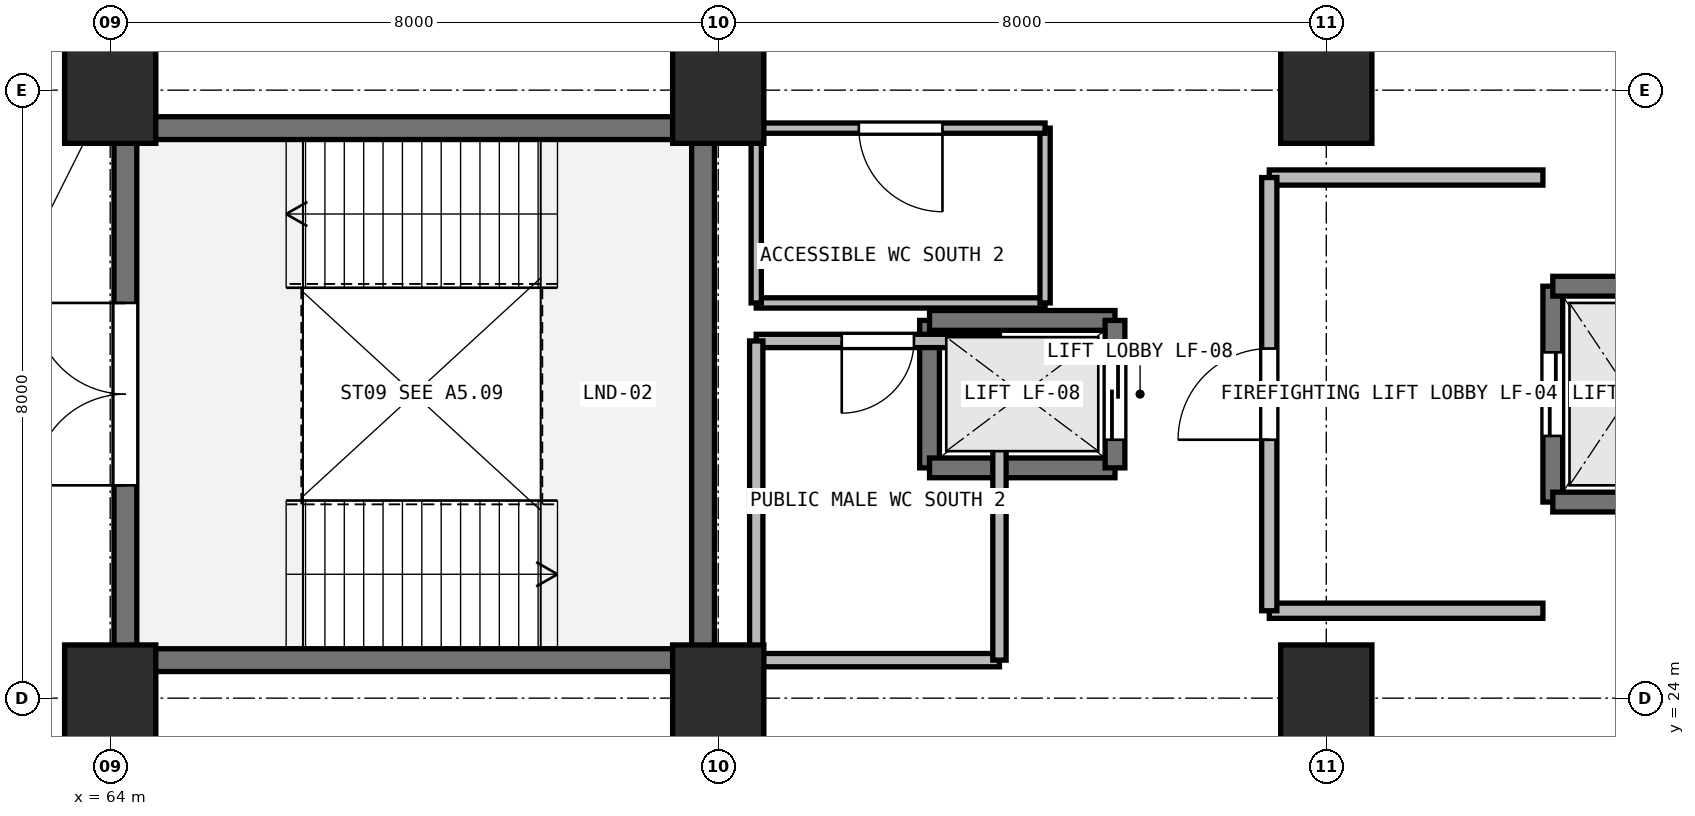
"""IFC4 building model, lengths in metres.
Left out: names, types, materials, properties, quantities, classifications, styles, units other than length and angle.
Written with IfcOpenShell. Run it as: python <this file> out.ifc"""

import sys

from ifc_helpers import new_model, si_unit, direction, frame, frame_2d, origin, origin_2d, place, context, subcontext, project, spatial, rectangle, extrude, element, fill, save


model = new_model("IFC4")
c1 = context("Model", 3, precision=1e-05, world=origin(), true_north=direction((0.0, 1.0)))
c2 = subcontext(c1, "Body", "Model", "MODEL_VIEW")
j1 = project(units=[si_unit("LENGTHUNIT", "METRE"), si_unit("PLANEANGLEUNIT", "RADIAN")], contexts=[c1])
p1 = place(None, origin())
s1 = spatial("IfcSite", under=j1, at=p1, CompositionType="ELEMENT")
p2 = place(p1, origin())
s2 = spatial("IfcBuilding", under=s1, at=p2, CompositionType="ELEMENT")
p3 = place(p2, origin())
s3 = spatial("IfcBuildingStorey", under=s2, at=p3, CompositionType="ELEMENT", Elevation=0.0)
for number, where, z_axis, x_axis in (
    (1, (64.0, 24.0, 0.0), (0.0, 0.0, 1.0), (1.0, 0.0, 0.0)),
    (2, (64.0, 32.0, 0.0), (0.0, 0.0, 1.0), (1.0, 0.0, 0.0)),
    (3, (72.0, 24.0, 0.0), (0.0, 0.0, 1.0), (1.0, 0.0, 0.0)),
    (4, (72.0, 32.0, 0.0), (0.0, 0.0, 1.0), (1.0, 0.0, 0.0)),
    (5, (80.0, 24.0, 0.0), (0.0, 0.0, 1.0), (1.0, 0.0, 0.0)),
    (6, (80.0, 32.0, 0.0), (0.0, 0.0, 1.0), (1.0, 0.0, 0.0)),
):
    element("IfcColumn", number, at=place(p3, frame(where, z_axis=z_axis, x_axis=x_axis)), inside=s3, PredefinedType="COLUMN", context=c2, shape_type="SweptSolid", body=[
        extrude(rectangle(XDim=1.2, YDim=1.4, at=origin_2d()), origin(), (0.0, 0.0, 1.0), 5.4),
    ])
p4 = place(p3, frame((71.8, 24.5, 0.0), z_axis=(0.0, 0.0, 1.0), x_axis=(-1.0, 0.0, 0.0)))
e7 = element("IfcWall", 7, at=p4, inside=s3, PredefinedType="SHEAR", context=c2, shape_type="SweptSolid", body=[
    extrude(rectangle(XDim=7.6, YDim=0.3, at=frame_2d((3.8, 0.0))), origin(), (0.0, 0.0, 1.0), 5.08),
])
p5 = place(p3, frame((64.2, 24.5, 0.0), z_axis=(0.0, 0.0, 1.0), x_axis=(0.0, 1.0, 0.0)))
e8 = element("IfcWall", 8, at=p5, inside=s3, PredefinedType="SHEAR", context=c2, shape_type="SweptSolid", body=[
    extrude(rectangle(XDim=7.0, YDim=0.3, at=frame_2d((3.5, 0.0))), origin(), (0.0, 0.0, 1.0), 5.08),
])
p6 = place(p5, frame((2.3, 0.0, 0.0)))
e9 = element("IfcOpeningElement", 9, at=p6, cuts=e8, PredefinedType="OPENING", context=c2, shape_type="SweptSolid", body=[
    extrude(rectangle(XDim=2.4, YDim=2.2, at=frame_2d((1.2, 1.1))), frame((0.0, 0.16, 0.0), z_axis=(0.0, -1.0, 0.0), x_axis=(1.0, 0.0, 0.0)), (0.0, 0.0, 1.0), 0.32),
])
p7 = place(p3, frame((64.2, 31.5, 0.0), z_axis=(0.0, 0.0, 1.0), x_axis=(1.0, 0.0, 0.0)))
e10 = element("IfcWall", 10, at=p7, inside=s3, PredefinedType="SHEAR", context=c2, shape_type="SweptSolid", body=[
    extrude(rectangle(XDim=7.6, YDim=0.3, at=frame_2d((3.8, 0.0))), origin(), (0.0, 0.0, 1.0), 5.08),
])
p8 = place(p3, frame((71.8, 31.5, 0.0), z_axis=(0.0, 0.0, 1.0), x_axis=(0.0, -1.0, 0.0)))
e11 = element("IfcWall", 11, at=p8, inside=s3, PredefinedType="SHEAR", context=c2, shape_type="SweptSolid", body=[
    extrude(rectangle(XDim=7.0, YDim=0.3, at=frame_2d((3.5, 0.0))), origin(), (0.0, 0.0, 1.0), 5.08),
])
p9 = place(p3, frame((82.98, 26.58, 0.0), z_axis=(0.0, 0.0, 1.0), x_axis=(0.0, 1.0, 0.0)))
e12 = element("IfcWall", 12, at=p9, inside=s3, PredefinedType="SHEAR", context=c2, shape_type="SweptSolid", body=[
    extrude(rectangle(XDim=2.84, YDim=0.26, at=frame_2d((1.42, 0.0))), origin(), (0.0, 0.0, 1.0), 5.08),
])
p10 = place(p9, frame((0.87, 0.0, 0.0)))
e13 = element("IfcOpeningElement", 13, at=p10, cuts=e12, PredefinedType="OPENING", context=c2, shape_type="SweptSolid", body=[
    extrude(rectangle(XDim=1.1, YDim=2.15, at=frame_2d((0.55, 1.075))), frame((0.0, 0.14, 0.0), z_axis=(0.0, -1.0, 0.0), x_axis=(1.0, 0.0, 0.0)), (0.0, 0.0, 1.0), 0.28),
])
for number, where, z_axis, x_axis in (
    (14, (82.98, 29.42, 0.0), (0.0, 0.0, 1.0), (1.0, 0.0, 0.0)),
    (15, (85.02, 26.58, 0.0), (0.0, 0.0, 1.0), (-1.0, 0.0, 0.0)),
):
    element("IfcWall", number, at=place(p3, frame(where, z_axis=z_axis, x_axis=x_axis)), inside=s3, PredefinedType="SHEAR", context=c2, shape_type="SweptSolid", body=[
        extrude(rectangle(XDim=2.04, YDim=0.26, at=frame_2d((1.02, 0.0))), origin(), (0.0, 0.0, 1.0), 5.08),
    ])
for number, where, z_axis, x_axis in (
    (16, (79.25, 30.85, 0.0), (0.0, 0.0, 1.0), (1.0, 0.0, 0.0)),
    (17, (82.85, 25.15, 0.0), (0.0, 0.0, 1.0), (-1.0, 0.0, 0.0)),
):
    element("IfcWall", number, at=place(p3, frame(where, z_axis=z_axis, x_axis=x_axis)), inside=s3, PredefinedType="PARTITIONING", context=c2, shape_type="SweptSolid", body=[
        extrude(rectangle(XDim=3.6, YDim=0.2, at=frame_2d((1.8, 0.0))), origin(), (0.0, 0.0, 1.0), 5.08),
    ])
p11 = place(p3, frame((79.25, 25.15, 0.0), z_axis=(0.0, 0.0, 1.0), x_axis=(0.0, 1.0, 0.0)))
e18 = element("IfcWall", 18, at=p11, inside=s3, PredefinedType="PARTITIONING", context=c2, shape_type="SweptSolid", body=[
    extrude(rectangle(XDim=5.7, YDim=0.2, at=frame_2d((2.85, 0.0))), origin(), (0.0, 0.0, 1.0), 4.05),
])
p12 = place(p11, frame((2.25, 0.0, 0.0)))
e19 = element("IfcOpeningElement", 19, at=p12, cuts=e18, PredefinedType="OPENING", context=c2, shape_type="SweptSolid", body=[
    extrude(rectangle(XDim=1.2, YDim=2.2, at=frame_2d((0.6, 1.1))), frame((0.0, 0.11, 0.0), z_axis=(0.0, -1.0, 0.0), x_axis=(1.0, 0.0, 0.0)), (0.0, 0.0, 1.0), 0.22),
])
p13 = place(p3, frame((74.78, 27.03, 0.0), z_axis=(0.0, 0.0, 1.0), x_axis=(0.0, 1.0, 0.0)))
e20 = element("IfcWall", 20, at=p13, inside=s3, PredefinedType="SHEAR", context=c2, shape_type="SweptSolid", body=[
    extrude(rectangle(XDim=1.94, YDim=0.26, at=frame_2d((0.97, 0.0))), origin(), (0.0, 0.0, 1.0), 5.08),
])
for number, where, z_axis, x_axis in (
    (21, (74.78, 28.97, 0.0), (0.0, 0.0, 1.0), (1.0, 0.0, 0.0)),
    (22, (77.22, 27.03, 0.0), (0.0, 0.0, 1.0), (-1.0, 0.0, 0.0)),
):
    element("IfcWall", number, at=place(p3, frame(where, z_axis=z_axis, x_axis=x_axis)), inside=s3, PredefinedType="SHEAR", context=c2, shape_type="SweptSolid", body=[
        extrude(rectangle(XDim=2.44, YDim=0.26, at=frame_2d((1.22, 0.0))), origin(), (0.0, 0.0, 1.0), 5.08),
    ])
p14 = place(p3, frame((77.22, 28.97, 0.0), z_axis=(0.0, 0.0, 1.0), x_axis=(0.0, -1.0, 0.0)))
e23 = element("IfcWall", 23, at=p14, inside=s3, PredefinedType="SHEAR", context=c2, shape_type="SweptSolid", body=[
    extrude(rectangle(XDim=1.94, YDim=0.26, at=frame_2d((0.97, 0.0))), origin(), (0.0, 0.0, 1.0), 5.08),
])
p15 = place(p14, frame((0.37, 0.0, 0.0)))
e24 = element("IfcOpeningElement", 24, at=p15, cuts=e23, PredefinedType="OPENING", context=c2, shape_type="SweptSolid", body=[
    extrude(rectangle(XDim=1.2, YDim=2.15, at=frame_2d((0.6, 1.075))), frame((0.0, 0.14, 0.0), z_axis=(0.0, -1.0, 0.0), x_axis=(1.0, 0.0, 0.0)), (0.0, 0.0, 1.0), 0.28),
])
p16 = place(p3, frame((72.5, 24.5, 0.0), z_axis=(0.0, 0.0, 1.0), x_axis=(1.0, 0.0, 0.0)))
e25 = element("IfcWall", 25, at=p16, inside=s3, PredefinedType="PARTITIONING", context=c2, shape_type="SweptSolid", body=[
    extrude(rectangle(XDim=3.2, YDim=0.175, at=frame_2d((1.6, 0.0))), origin(), (0.0, 0.0, 1.0), 4.05),
])
p17 = place(p3, frame((75.7, 24.5, 0.0), z_axis=(0.0, 0.0, 1.0), x_axis=(0.0, 1.0, 0.0)))
e26 = element("IfcWall", 26, at=p17, inside=s3, PredefinedType="PARTITIONING", context=c2, shape_type="SweptSolid", body=[
    extrude(rectangle(XDim=4.2, YDim=0.175, at=frame_2d((2.1, 0.0))), origin(), (0.0, 0.0, 1.0), 5.08),
])
p18 = place(p3, frame((75.7, 28.7, 0.0), z_axis=(0.0, 0.0, 1.0), x_axis=(-1.0, 0.0, 0.0)))
e27 = element("IfcWall", 27, at=p18, inside=s3, PredefinedType="PARTITIONING", context=c2, shape_type="SweptSolid", body=[
    extrude(rectangle(XDim=3.2, YDim=0.175, at=frame_2d((1.6, 0.0))), origin(), (0.0, 0.0, 1.0), 5.08),
])
p19 = place(p18, frame((1.125, 0.0, 0.0)))
e28 = element("IfcOpeningElement", 28, at=p19, cuts=e27, PredefinedType="OPENING", context=c2, shape_type="SweptSolid", body=[
    extrude(rectangle(XDim=0.95, YDim=2.15, at=frame_2d((0.475, 1.075))), frame((0.0, 0.098, 0.0), z_axis=(0.0, -1.0, 0.0), x_axis=(1.0, 0.0, 0.0)), (0.0, 0.0, 1.0), 0.195),
])
p20 = place(p3, frame((72.5, 28.7, 0.0), z_axis=(0.0, 0.0, 1.0), x_axis=(0.0, -1.0, 0.0)))
e29 = element("IfcWall", 29, at=p20, inside=s3, PredefinedType="PARTITIONING", context=c2, shape_type="SweptSolid", body=[
    extrude(rectangle(XDim=4.2, YDim=0.175, at=frame_2d((2.1, 0.0))), origin(), (0.0, 0.0, 1.0), 4.05),
])
p21 = place(p3, frame((72.5, 29.2, 0.0), z_axis=(0.0, 0.0, 1.0), x_axis=(1.0, 0.0, 0.0)))
e30 = element("IfcWall", 30, at=p21, inside=s3, PredefinedType="PARTITIONING", context=c2, shape_type="SweptSolid", body=[
    extrude(rectangle(XDim=3.8, YDim=0.135, at=frame_2d((1.9, 0.0))), origin(), (0.0, 0.0, 1.0), 5.08),
])
p22 = place(p3, frame((76.3, 29.2, 0.0), z_axis=(0.0, 0.0, 1.0), x_axis=(0.0, 1.0, 0.0)))
e31 = element("IfcWall", 31, at=p22, inside=s3, PredefinedType="PARTITIONING", context=c2, shape_type="SweptSolid", body=[
    extrude(rectangle(XDim=2.3, YDim=0.135, at=frame_2d((1.15, 0.0))), origin(), (0.0, 0.0, 1.0), 5.08),
])
p23 = place(p3, frame((76.3, 31.5, 0.0), z_axis=(0.0, 0.0, 1.0), x_axis=(-1.0, 0.0, 0.0)))
e32 = element("IfcWall", 32, at=p23, inside=s3, PredefinedType="PARTITIONING", context=c2, shape_type="SweptSolid", body=[
    extrude(rectangle(XDim=3.8, YDim=0.135, at=frame_2d((1.9, 0.0))), origin(), (0.0, 0.0, 1.0), 4.05),
])
p24 = place(p23, frame((1.35, 0.0, 0.0)))
e33 = element("IfcOpeningElement", 33, at=p24, cuts=e32, PredefinedType="OPENING", context=c2, shape_type="SweptSolid", body=[
    extrude(rectangle(XDim=1.1, YDim=2.15, at=frame_2d((0.55, 1.075))), frame((0.0, 0.078, 0.0), z_axis=(0.0, -1.0, 0.0), x_axis=(1.0, 0.0, 0.0)), (0.0, 0.0, 1.0), 0.155),
])
p25 = place(p3, frame((72.5, 31.5, 0.0), z_axis=(0.0, 0.0, 1.0), x_axis=(0.0, -1.0, 0.0)))
e34 = element("IfcWall", 34, at=p25, inside=s3, PredefinedType="PARTITIONING", context=c2, shape_type="SweptSolid", body=[
    extrude(rectangle(XDim=2.3, YDim=0.135, at=frame_2d((1.15, 0.0))), origin(), (0.0, 0.0, 1.0), 4.05),
])
p26 = place(p6, origin())
e35 = element("IfcDoor", 35, at=p26, inside=s3, OperationType="DOUBLE_DOOR_SINGLE_SWING", PredefinedType="DOOR", context=c2, shape_type="SweptSolid", body=[
    extrude(rectangle(XDim=2.4, YDim=2.2, at=frame_2d((1.2, 1.1))), frame((0.0, 0.025, 0.0), z_axis=(0.0, -1.0, 0.0), x_axis=(1.0, 0.0, 0.0)), (0.0, 0.0, 1.0), 0.05),
])
fill(e9, e35)
p27 = place(p10, origin())
e36 = element("IfcDoor", 36, at=p27, inside=s3, OperationType="SLIDING_TO_LEFT", PredefinedType="DOOR", context=c2, shape_type="SweptSolid", body=[
    extrude(rectangle(XDim=1.1, YDim=2.15, at=frame_2d((0.55, 1.075))), frame((0.0, 0.025, 0.0), z_axis=(0.0, -1.0, 0.0), x_axis=(1.0, 0.0, 0.0)), (0.0, 0.0, 1.0), 0.05),
])
fill(e13, e36)
p28 = place(p12, origin())
e37 = element("IfcDoor", 37, at=p28, inside=s3, OperationType="SINGLE_SWING_LEFT", PredefinedType="DOOR", context=c2, shape_type="SweptSolid", body=[
    extrude(rectangle(XDim=1.2, YDim=2.2, at=frame_2d((0.6, 1.1))), frame((0.0, 0.025, 0.0), z_axis=(0.0, -1.0, 0.0), x_axis=(1.0, 0.0, 0.0)), (0.0, 0.0, 1.0), 0.05),
])
fill(e19, e37)
p29 = place(p15, origin())
e38 = element("IfcDoor", 38, at=p29, inside=s3, OperationType="SLIDING_TO_LEFT", PredefinedType="DOOR", context=c2, shape_type="SweptSolid", body=[
    extrude(rectangle(XDim=1.2, YDim=2.15, at=frame_2d((0.6, 1.075))), frame((0.0, 0.025, 0.0), z_axis=(0.0, -1.0, 0.0), x_axis=(1.0, 0.0, 0.0)), (0.0, 0.0, 1.0), 0.05),
])
fill(e24, e38)
p30 = place(p19, origin())
e39 = element("IfcDoor", 39, at=p30, inside=s3, OperationType="SINGLE_SWING_RIGHT", PredefinedType="DOOR", context=c2, shape_type="SweptSolid", body=[
    extrude(rectangle(XDim=0.95, YDim=2.15, at=frame_2d((0.475, 1.075))), frame((0.0, 0.025, 0.0), z_axis=(0.0, -1.0, 0.0), x_axis=(1.0, 0.0, 0.0)), (0.0, 0.0, 1.0), 0.05),
])
fill(e28, e39)
p31 = place(p24, origin())
e40 = element("IfcDoor", 40, at=p31, inside=s3, OperationType="SINGLE_SWING_LEFT", PredefinedType="DOOR", context=c2, shape_type="SweptSolid", body=[
    extrude(rectangle(XDim=1.1, YDim=2.15, at=frame_2d((0.55, 1.075))), frame((0.0, 0.025, 0.0), z_axis=(0.0, -1.0, 0.0), x_axis=(1.0, 0.0, 0.0)), (0.0, 0.0, 1.0), 0.05),
])
fill(e33, e40)
save(model, sys.argv[1])
